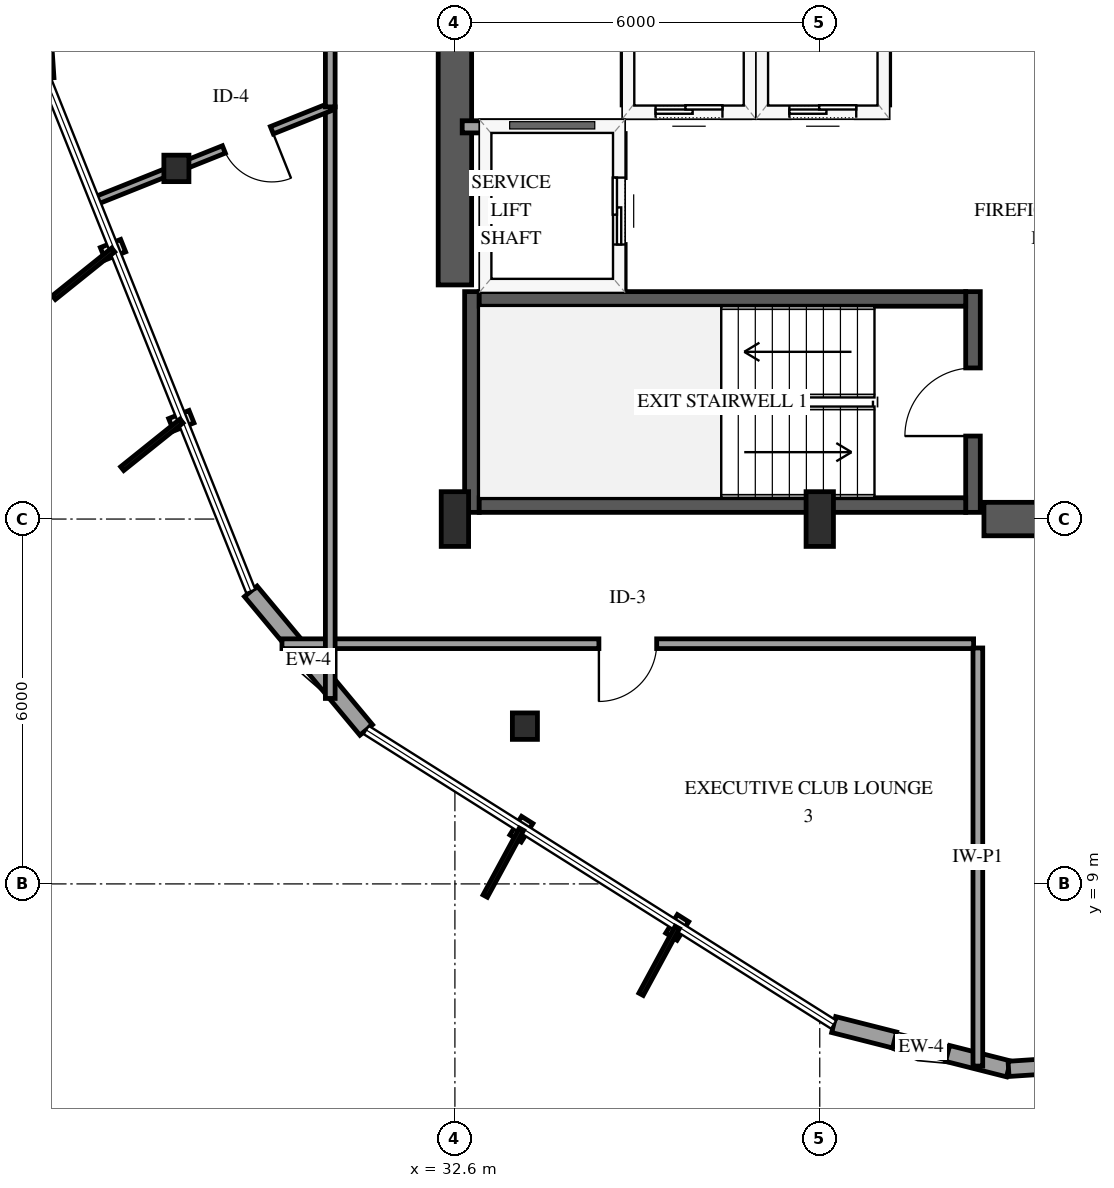
"""IFC4 building model, lengths in metres.
Left out: names, types, materials, properties, quantities, classifications, styles, units other than length and angle.
Written with IfcOpenShell. Run it as: python <this file> out.ifc"""

import sys

from ifc_helpers import new_model, si_unit, direction, frame, frame_2d, origin, origin_2d, place, context, subcontext, project, spatial, rectangle, i_section, extrude, element, fill, save


model = new_model("IFC4")
c1 = context("Model", 3, precision=1e-05, world=origin(), true_north=direction((0.0, 1.0)))
c2 = subcontext(c1, "Body", "Model", "MODEL_VIEW")
j1 = project(units=[si_unit("LENGTHUNIT", "METRE"), si_unit("PLANEANGLEUNIT", "RADIAN")], contexts=[c1])
p1 = place(None, origin())
s1 = spatial("IfcSite", under=j1, at=p1, CompositionType="ELEMENT")
p2 = place(p1, origin())
s2 = spatial("IfcBuilding", under=s1, at=p2, CompositionType="ELEMENT")
p3 = place(p2, frame((0.0, 0.0, 178.6)))
s3 = spatial("IfcBuildingStorey", under=s2, at=p3, CompositionType="ELEMENT", Elevation=178.6)
p4 = place(p3, frame((32.88, 15.11, 0.0), z_axis=(0.0, 0.0, 1.0), x_axis=(0.0, 1.0, 0.0)))
e1 = element("IfcWall", 1, at=p4, inside=s3, PredefinedType="SHEAR", context=c2, shape_type="SweptSolid", body=[
    extrude(rectangle(XDim=3.63, YDim=0.24, at=frame_2d((1.815, 0.0))), origin(), (0.0, 0.0, 1.0), 3.6),
])
p5 = place(p3, frame((41.12, 15.11, 0.0), z_axis=(0.0, 0.0, 1.0), x_axis=(0.0, 1.0, 0.0)))
e2 = element("IfcWall", 2, at=p5, inside=s3, PredefinedType="SHEAR", context=c2, shape_type="SweptSolid", body=[
    extrude(rectangle(XDim=3.63, YDim=0.24, at=frame_2d((1.815, 0.0))), origin(), (0.0, 0.0, 1.0), 3.6),
])
p6 = place(p5, frame((1.255, 0.0, 0.0)))
e3 = element("IfcOpeningElement", 3, at=p6, cuts=e2, PredefinedType="OPENING", context=c2, shape_type="SweptSolid", body=[
    extrude(rectangle(XDim=1.12, YDim=2.15, at=frame_2d((0.56, 1.075))), frame((0.0, 0.13, 0.0), z_axis=(0.0, -1.0, 0.0), x_axis=(1.0, 0.0, 0.0)), (0.0, 0.0, 1.0), 0.26),
])
for number, where, z_axis, x_axis in (
    (4, (33.0, 15.23, 0.0), (0.0, 0.0, 1.0), (1.0, 0.0, 0.0)),
    (5, (33.0, 18.62, 0.0), (0.0, 0.0, 1.0), (1.0, 0.0, 0.0)),
):
    element("IfcWall", number, at=place(p3, frame(where, z_axis=z_axis, x_axis=x_axis)), inside=s3, PredefinedType="SHEAR", context=c2, shape_type="SweptSolid", body=[
        extrude(rectangle(XDim=8.0, YDim=0.24, at=frame_2d((4.0, 0.0))), origin(), (0.0, 0.0, 1.0), 3.6),
    ])
p7 = place(p3, frame((32.6, 18.85, 0.0), z_axis=(0.0, 0.0, 1.0), x_axis=(0.0, 1.0, 0.0)))
e6 = element("IfcWall", 6, at=p7, inside=s3, PredefinedType="SHEAR", context=c2, shape_type="SweptSolid", body=[
    extrude(rectangle(XDim=12.3, YDim=0.55, at=frame_2d((6.15, 0.0))), origin(), (0.0, 0.0, 1.0), 3.6),
])
p8 = place(p3, frame((41.3, 15.0, 0.0), z_axis=(0.0, 0.0, 1.0), x_axis=(1.0, 0.0, 0.0)))
e7 = element("IfcWall", 7, at=p8, inside=s3, PredefinedType="SHEAR", context=c2, shape_type="SweptSolid", body=[
    extrude(rectangle(XDim=2.85, YDim=0.55, at=frame_2d((1.425, 0.0))), origin(), (0.0, 0.0, 1.0), 3.6),
])
for number, where, z_axis, x_axis in (
    (8, (32.6, 15.0, 0.0), (0.0, 0.0, 1.0), (1.0, 0.0, 0.0)),
    (9, (38.6, 15.0, 0.0), (0.0, 0.0, 1.0), (1.0, 0.0, 0.0)),
):
    element("IfcColumn", number, at=place(p3, frame(where, z_axis=z_axis, x_axis=x_axis)), inside=s3, PredefinedType="PILASTER", context=c2, shape_type="SweptSolid", body=[
        extrude(rectangle(XDim=0.45, YDim=0.9, at=origin_2d()), origin(), (0.0, 0.0, 1.0), 3.6),
    ])
for number, where, z_axis, x_axis in (
    (10, (28.02, 20.766, 0.0), (0.0, 0.0, 1.0), (1.0, 0.0, 0.0)),
    (11, (33.751, 11.594, 0.0), (0.0, 0.0, 1.0), (1.0, 0.0, 0.0)),
):
    element("IfcColumn", number, at=place(p3, frame(where, z_axis=z_axis, x_axis=x_axis)), inside=s3, PredefinedType="COLUMN", context=c2, shape_type="SweptSolid", body=[
        extrude(i_section(OverallWidth=0.412, OverallDepth=0.435, WebThickness=0.036, FlangeThickness=0.057, FilletRadius=0.038, at=origin_2d()), origin(), (0.0, 0.0, 1.0), 3.6),
    ])
p9 = place(p3, frame((25.676, 25.21, 0.0), z_axis=(0.0, 0.0, 1.0), x_axis=(0.065923586617, -0.997824674343, 0.0)))
e12 = element("IfcWall", 12, at=p9, inside=s3, PredefinedType="SOLIDWALL", context=c2, shape_type="SweptSolid", body=[
    extrude(rectangle(XDim=2.966, YDim=0.27, at=frame_2d((1.483, 0.0))), origin(), (0.0, 0.0, 1.0), 2.679),
])
p10 = place(p9, frame((1.033, 0.0, 0.75)))
e13 = element("IfcOpeningElement", 13, at=p10, cuts=e12, PredefinedType="OPENING", context=c2, shape_type="SweptSolid", body=[
    extrude(rectangle(XDim=0.9, YDim=1.5, at=frame_2d((0.45, 0.75))), frame((0.0, 0.145, 0.0), z_axis=(0.0, -1.0, 0.0), x_axis=(1.0, 0.0, 0.0)), (0.0, 0.0, 1.0), 0.29),
])
p11 = place(p3, frame((29.243, 13.811, 0.0), z_axis=(0.0, 0.0, 1.0), x_axis=(0.639811943849, -0.768531506517, 0.0)))
e14 = element("IfcWall", 14, at=p11, inside=s3, PredefinedType="SOLIDWALL", context=c2, shape_type="SweptSolid", body=[
    extrude(rectangle(XDim=2.966, YDim=0.27, at=frame_2d((1.483, 0.0))), origin(), (0.0, 0.0, 1.0), 2.679),
])
p12 = place(p3, frame((38.829, 6.687, 0.0), z_axis=(0.0, 0.0, 1.0), x_axis=(0.969353138007, -0.245671516128, 0.0)))
e15 = element("IfcWall", 15, at=p12, inside=s3, PredefinedType="SOLIDWALL", context=c2, shape_type="SweptSolid", body=[
    extrude(rectangle(XDim=2.966, YDim=0.27, at=frame_2d((1.483, 0.0))), origin(), (0.0, 0.0, 1.0), 2.679),
])
p13 = place(p12, frame((1.033, 0.0, 0.75)))
e16 = element("IfcOpeningElement", 16, at=p13, cuts=e15, PredefinedType="OPENING", context=c2, shape_type="SweptSolid", body=[
    extrude(rectangle(XDim=0.9, YDim=1.5, at=frame_2d((0.45, 0.75))), frame((0.0, 0.145, 0.0), z_axis=(0.0, -1.0, 0.0), x_axis=(1.0, 0.0, 0.0)), (0.0, 0.0, 1.0), 0.29),
])
p14 = place(p3, frame((41.705, 5.958, 0.0), z_axis=(0.0, 0.0, 1.0), x_axis=(0.997825981394, 0.06590380001, 0.0)))
e17 = element("IfcWall", 17, at=p14, inside=s3, PredefinedType="SOLIDWALL", context=c2, shape_type="SweptSolid", body=[
    extrude(rectangle(XDim=9.087, YDim=0.25, at=frame_2d((4.543, 0.0))), origin(), (0.0, 0.0, 1.0), 2.679),
])
p15 = place(p14, frame((4.043, 0.0, 0.0)))
e18 = element("IfcOpeningElement", 18, at=p15, cuts=e17, PredefinedType="OPENING", context=c2, shape_type="SweptSolid", body=[
    extrude(rectangle(XDim=1.0, YDim=2.15, at=frame_2d((0.5, 1.075))), frame((0.0, 0.135, 0.0), z_axis=(0.0, -1.0, 0.0), x_axis=(1.0, 0.0, 0.0)), (0.0, 0.0, 1.0), 0.27),
])
p16 = place(p14, frame((1.875, 0.0, 0.72)))
e19 = element("IfcOpeningElement", 19, at=p16, cuts=e17, PredefinedType="OPENING", context=c2, shape_type="SweptSolid", body=[
    extrude(rectangle(XDim=1.05, YDim=1.55, at=frame_2d((0.525, 0.775))), frame((0.0, 0.135, 0.0), z_axis=(0.0, -1.0, 0.0), x_axis=(1.0, 0.0, 0.0)), (0.0, 0.0, 1.0), 0.27),
])
p17 = place(p14, frame((5.684, 0.0, 0.72)))
e20 = element("IfcOpeningElement", 20, at=p17, cuts=e17, PredefinedType="OPENING", context=c2, shape_type="SweptSolid", body=[
    extrude(rectangle(XDim=1.05, YDim=1.55, at=frame_2d((0.525, 0.775))), frame((0.0, 0.135, 0.0), z_axis=(0.0, -1.0, 0.0), x_axis=(1.0, 0.0, 0.0)), (0.0, 0.0, 1.0), 0.27),
])
p18 = place(p3, frame((35.45, 21.7, 0.0), z_axis=(0.0, 0.0, 1.0), x_axis=(1.0, 0.0, 0.0)))
e21 = element("IfcWall", 21, at=p18, inside=s3, PredefinedType="SOLIDWALL", context=c2, shape_type="SweptSolid", body=[
    extrude(rectangle(XDim=2.0, YDim=0.2, at=frame_2d((1.0, 0.0))), origin(), (0.0, 0.0, 1.0), 3.3),
])
p19 = place(p18, frame((0.45, 0.0, 0.0)))
e22 = element("IfcOpeningElement", 22, at=p19, cuts=e21, PredefinedType="OPENING", context=c2, shape_type="SweptSolid", body=[
    extrude(rectangle(XDim=1.1, YDim=2.15, at=frame_2d((0.55, 1.075))), frame((0.0, 0.11, 0.0), z_axis=(0.0, -1.0, 0.0), x_axis=(1.0, 0.0, 0.0)), (0.0, 0.0, 1.0), 0.22),
])
for number, where, z_axis, x_axis in (
    (23, (35.45, 21.81, 0.0), (0.0, 0.0, 1.0), (0.0, 1.0, 0.0)),
    (24, (37.45, 21.81, 0.0), (0.0, 0.0, 1.0), (0.0, 1.0, 0.0)),
):
    element("IfcWall", number, at=place(p3, frame(where, z_axis=z_axis, x_axis=x_axis)), inside=s3, PredefinedType="SOLIDWALL", context=c2, shape_type="SweptSolid", body=[
        extrude(rectangle(XDim=2.38, YDim=0.2, at=frame_2d((1.19, 0.0))), origin(), (0.0, 0.0, 1.0), 3.3),
    ])
p20 = place(p3, frame((37.65, 21.7, 0.0), z_axis=(0.0, 0.0, 1.0), x_axis=(1.0, 0.0, 0.0)))
e25 = element("IfcWall", 25, at=p20, inside=s3, PredefinedType="SOLIDWALL", context=c2, shape_type="SweptSolid", body=[
    extrude(rectangle(XDim=2.0, YDim=0.2, at=frame_2d((1.0, 0.0))), origin(), (0.0, 0.0, 1.0), 3.3),
])
p21 = place(p20, frame((0.45, 0.0, 0.0)))
e26 = element("IfcOpeningElement", 26, at=p21, cuts=e25, PredefinedType="OPENING", context=c2, shape_type="SweptSolid", body=[
    extrude(rectangle(XDim=1.1, YDim=2.15, at=frame_2d((0.55, 1.075))), frame((0.0, 0.11, 0.0), z_axis=(0.0, -1.0, 0.0), x_axis=(1.0, 0.0, 0.0)), (0.0, 0.0, 1.0), 0.22),
])
p22 = place(p3, frame((39.65, 21.81, 0.0), z_axis=(0.0, 0.0, 1.0), x_axis=(0.0, 1.0, 0.0)))
e27 = element("IfcWall", 27, at=p22, inside=s3, PredefinedType="SOLIDWALL", context=c2, shape_type="SweptSolid", body=[
    extrude(rectangle(XDim=2.38, YDim=0.2, at=frame_2d((1.19, 0.0))), origin(), (0.0, 0.0, 1.0), 3.3),
])
p23 = place(p3, frame((32.72, 21.45, 0.0), z_axis=(0.0, 0.0, 1.0), x_axis=(1.0, 0.0, 0.0)))
e28 = element("IfcWall", 28, at=p23, inside=s3, PredefinedType="SOLIDWALL", context=c2, shape_type="SweptSolid", body=[
    extrude(rectangle(XDim=2.58, YDim=0.2, at=frame_2d((1.29, 0.0))), origin(), (0.0, 0.0, 1.0), 3.3),
])
p24 = place(p3, frame((35.3, 18.79, 0.0), z_axis=(0.0, 0.0, 1.0), x_axis=(0.0, 1.0, 0.0)))
e29 = element("IfcWall", 29, at=p24, inside=s3, PredefinedType="SOLIDWALL", context=c2, shape_type="SweptSolid", body=[
    extrude(rectangle(XDim=2.55, YDim=0.2, at=frame_2d((1.275, 0.0))), origin(), (0.0, 0.0, 1.0), 3.3),
])
p25 = place(p24, frame((0.725, 0.0, 0.0)))
e30 = element("IfcOpeningElement", 30, at=p25, cuts=e29, PredefinedType="OPENING", context=c2, shape_type="SweptSolid", body=[
    extrude(rectangle(XDim=1.1, YDim=2.15, at=frame_2d((0.55, 1.075))), frame((0.0, 0.11, 0.0), z_axis=(0.0, -1.0, 0.0), x_axis=(1.0, 0.0, 0.0)), (0.0, 0.0, 1.0), 0.22),
])
p26 = place(p3, frame((41.13, 12.95, 0.0), z_axis=(0.0, 0.0, 1.0), x_axis=(-1.0, 0.0, 0.0)))
e31 = element("IfcWall", 31, at=p26, inside=s3, PredefinedType="PARTITIONING", context=c2, shape_type="SweptSolid", body=[
    extrude(rectangle(XDim=11.374, YDim=0.16, at=frame_2d((5.687, 0.0))), origin(), (0.0, 0.0, 1.0), 3.3),
])
p27 = place(p26, frame((5.212, 0.0, 0.0)))
e32 = element("IfcOpeningElement", 32, at=p27, cuts=e31, PredefinedType="OPENING", context=c2, shape_type="SweptSolid", body=[
    extrude(rectangle(XDim=0.95, YDim=2.15, at=frame_2d((0.475, 1.075))), frame((0.0, 0.09, 0.0), z_axis=(0.0, -1.0, 0.0), x_axis=(1.0, 0.0, 0.0)), (0.0, 0.0, 1.0), 0.18),
])
p28 = place(p3, frame((30.55, 12.05, 0.0), z_axis=(0.0, 0.0, 1.0), x_axis=(0.0, 1.0, 0.0)))
e33 = element("IfcWall", 33, at=p28, inside=s3, PredefinedType="PARTITIONING", context=c2, shape_type="SweptSolid", body=[
    extrude(rectangle(XDim=9.728, YDim=0.16, at=frame_2d((4.864, 0.0))), origin(), (0.0, 0.0, 1.0), 3.3),
])
p29 = place(p3, frame((41.2, 6.004, 0.0), z_axis=(0.0, 0.0, 1.0), x_axis=(0.0, 1.0, 0.0)))
e34 = element("IfcWall", 34, at=p29, inside=s3, PredefinedType="PARTITIONING", context=c2, shape_type="SweptSolid", body=[
    extrude(rectangle(XDim=6.876, YDim=0.16, at=frame_2d((3.438, 0.0))), origin(), (0.0, 0.0, 1.0), 3.3),
])
p30 = place(p3, frame((30.55, 21.778, 0.0), z_axis=(0.0, 0.0, 1.0), x_axis=(-0.928504957858, -0.371320001121, 0.0)))
e35 = element("IfcWall", 35, at=p30, inside=s3, PredefinedType="PARTITIONING", context=c2, shape_type="SweptSolid", body=[
    extrude(rectangle(XDim=4.169, YDim=0.13, at=frame_2d((2.084, 0.0))), origin(), (0.0, 0.0, 1.0), 3.3),
])
p31 = place(p30, frame((1.034, 0.0, 0.0)))
e36 = element("IfcOpeningElement", 36, at=p31, cuts=e35, PredefinedType="OPENING", context=c2, shape_type="SweptSolid", body=[
    extrude(rectangle(XDim=0.85, YDim=2.1, at=frame_2d((0.425, 1.05))), frame((0.0, 0.075, 0.0), z_axis=(0.0, -1.0, 0.0), x_axis=(1.0, 0.0, 0.0)), (0.0, 0.0, 1.0), 0.15),
])
p32 = place(p3, frame((30.55, 21.778, 0.0), z_axis=(0.0, 0.0, 1.0), x_axis=(0.0, 1.0, 0.0)))
e37 = element("IfcWall", 37, at=p32, inside=s3, PredefinedType="PARTITIONING", context=c2, shape_type="SweptSolid", body=[
    extrude(rectangle(XDim=8.555, YDim=0.16, at=frame_2d((4.277, 0.0))), origin(), (0.0, 0.0, 1.0), 3.3),
])
p33 = place(p13, origin())
e38 = element("IfcWindow", 38, at=p33, inside=s3, PartitioningType="SINGLE_PANEL", PredefinedType="WINDOW", context=c2, shape_type="SweptSolid", body=[
    extrude(rectangle(XDim=0.9, YDim=1.5, at=frame_2d((0.45, 0.75))), frame((0.0, 0.03, 0.0), z_axis=(0.0, -1.0, 0.0), x_axis=(1.0, 0.0, 0.0)), (0.0, 0.0, 1.0), 0.06),
])
fill(e16, e38)
p34 = place(p19, origin())
e39 = element("IfcDoor", 39, at=p34, inside=s3, OperationType="SLIDING_TO_LEFT", PredefinedType="DOOR", context=c2, shape_type="SweptSolid", body=[
    extrude(rectangle(XDim=1.1, YDim=2.15, at=frame_2d((0.55, 1.075))), frame((0.0, 0.025, 0.0), z_axis=(0.0, -1.0, 0.0), x_axis=(1.0, 0.0, 0.0)), (0.0, 0.0, 1.0), 0.05),
])
fill(e22, e39)
p35 = place(p21, origin())
e40 = element("IfcDoor", 40, at=p35, inside=s3, OperationType="SLIDING_TO_LEFT", PredefinedType="DOOR", context=c2, shape_type="SweptSolid", body=[
    extrude(rectangle(XDim=1.1, YDim=2.15, at=frame_2d((0.55, 1.075))), frame((0.0, 0.025, 0.0), z_axis=(0.0, -1.0, 0.0), x_axis=(1.0, 0.0, 0.0)), (0.0, 0.0, 1.0), 0.05),
])
fill(e26, e40)
p36 = place(p25, origin())
e41 = element("IfcDoor", 41, at=p36, inside=s3, OperationType="SLIDING_TO_LEFT", PredefinedType="DOOR", context=c2, shape_type="SweptSolid", body=[
    extrude(rectangle(XDim=1.1, YDim=2.15, at=frame_2d((0.55, 1.075))), frame((0.0, 0.025, 0.0), z_axis=(0.0, -1.0, 0.0), x_axis=(1.0, 0.0, 0.0)), (0.0, 0.0, 1.0), 0.05),
])
fill(e30, e41)
p37 = place(p6, origin())
e42 = element("IfcDoor", 42, at=p37, inside=s3, OperationType="SINGLE_SWING_LEFT", PredefinedType="DOOR", context=c2, shape_type="SweptSolid", body=[
    extrude(rectangle(XDim=1.12, YDim=2.15, at=frame_2d((0.56, 1.075))), frame((0.0, 0.025, 0.0), z_axis=(0.0, -1.0, 0.0), x_axis=(1.0, 0.0, 0.0)), (0.0, 0.0, 1.0), 0.05),
])
fill(e3, e42)
p38 = place(p27, origin())
e43 = element("IfcDoor", 43, at=p38, inside=s3, OperationType="SINGLE_SWING_RIGHT", PredefinedType="DOOR", context=c2, shape_type="SweptSolid", body=[
    extrude(rectangle(XDim=0.95, YDim=2.15, at=frame_2d((0.475, 1.075))), frame((0.0, 0.025, 0.0), z_axis=(0.0, -1.0, 0.0), x_axis=(1.0, 0.0, 0.0)), (0.0, 0.0, 1.0), 0.05),
])
fill(e32, e43)
p39 = place(p31, origin())
e44 = element("IfcDoor", 44, at=p39, inside=s3, OperationType="SINGLE_SWING_LEFT", PredefinedType="DOOR", context=c2, shape_type="SweptSolid", body=[
    extrude(rectangle(XDim=0.85, YDim=2.1, at=frame_2d((0.425, 1.05))), frame((0.0, 0.025, 0.0), z_axis=(0.0, -1.0, 0.0), x_axis=(1.0, 0.0, 0.0)), (0.0, 0.0, 1.0), 0.05),
])
fill(e36, e44)
save(model, sys.argv[1])
